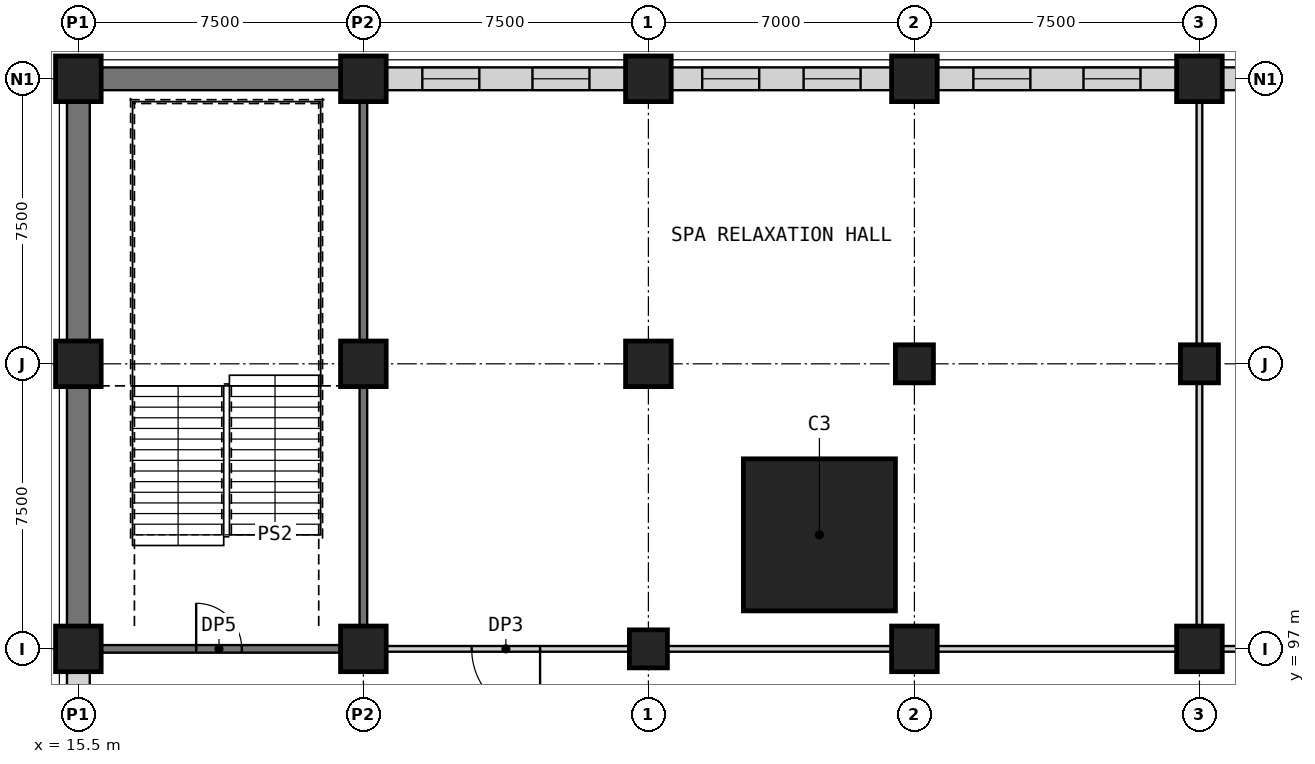
"""IFC4 building model, lengths in metres.
Left out: names, types, materials, properties, quantities, classifications, styles, units other than length and angle.
Written with IfcOpenShell. Run it as: python <this file> out.ifc"""

import sys

from ifc_helpers import new_model, si_unit, direction, frame, frame_2d, origin, origin_2d, place, context, subcontext, project, spatial, rectangle, extrude, element, fill, save


model = new_model("IFC4")
c1 = context("Model", 3, precision=1e-05, world=origin(), true_north=direction((0.0, 1.0)))
c2 = subcontext(c1, "Body", "Model", "MODEL_VIEW")
j1 = project(units=[si_unit("LENGTHUNIT", "METRE"), si_unit("PLANEANGLEUNIT", "RADIAN")], contexts=[c1])
p1 = place(None, origin())
s1 = spatial("IfcSite", under=j1, at=p1, CompositionType="ELEMENT")
p2 = place(p1, origin())
s2 = spatial("IfcBuilding", under=s1, at=p2, CompositionType="ELEMENT")
p3 = place(p2, frame((0.0, 0.0, 29.0)))
s3 = spatial("IfcBuildingStorey", under=s2, at=p3, CompositionType="ELEMENT", Elevation=29.0)
p4 = place(p3, frame((30.5, 97.0, 0.0), z_axis=(0.0, 0.0, 1.0), x_axis=(1.0, 0.0, 0.0)))
e1 = element("IfcColumn", 1, at=p4, inside=s3, PredefinedType="COLUMN", context=c2, shape_type="SweptSolid", body=[
    extrude(rectangle(XDim=1.0, YDim=1.0, at=origin_2d()), origin(), (0.0, 0.0, 1.0), 5.0),
])
p5 = place(p3, frame((37.5, 97.0, 0.0), z_axis=(0.0, 0.0, 1.0), x_axis=(1.0, 0.0, 0.0)))
e2 = element("IfcColumn", 2, at=p5, inside=s3, PredefinedType="COLUMN", context=c2, shape_type="SweptSolid", body=[
    extrude(rectangle(XDim=1.2, YDim=1.2, at=origin_2d()), origin(), (0.0, 0.0, 1.0), 5.0),
])
p6 = place(p3, frame((37.5, 104.5, 0.0), z_axis=(0.0, 0.0, 1.0), x_axis=(1.0, 0.0, 0.0)))
e3 = element("IfcColumn", 3, at=p6, inside=s3, PredefinedType="COLUMN", context=c2, shape_type="SweptSolid", body=[
    extrude(rectangle(XDim=1.0, YDim=1.0, at=origin_2d()), origin(), (0.0, 0.0, 1.0), 5.0),
])
p7 = place(p3, frame((45.0, 97.0, 0.0), z_axis=(0.0, 0.0, 1.0), x_axis=(1.0, 0.0, 0.0)))
e4 = element("IfcColumn", 4, at=p7, inside=s3, PredefinedType="COLUMN", context=c2, shape_type="SweptSolid", body=[
    extrude(rectangle(XDim=1.2, YDim=1.2, at=origin_2d()), origin(), (0.0, 0.0, 1.0), 5.0),
])
p8 = place(p3, frame((45.0, 104.5, 0.0), z_axis=(0.0, 0.0, 1.0), x_axis=(1.0, 0.0, 0.0)))
e5 = element("IfcColumn", 5, at=p8, inside=s3, PredefinedType="COLUMN", context=c2, shape_type="SweptSolid", body=[
    extrude(rectangle(XDim=1.0, YDim=1.0, at=origin_2d()), origin(), (0.0, 0.0, 1.0), 5.0),
])
p9 = place(p3, frame((35.0, 100.0, 0.0), z_axis=(0.0, 0.0, 1.0), x_axis=(1.0, 0.0, 0.0)))
e6 = element("IfcColumn", 6, at=p9, inside=s3, PredefinedType="COLUMN", context=c2, shape_type="SweptSolid", body=[
    extrude(rectangle(XDim=4.0, YDim=4.0, at=origin_2d()), origin(), (0.0, 0.0, 1.0), 5.0),
])
for number, where, z_axis, x_axis in (
    (7, (15.5, 97.0, 0.0), (0.0, 0.0, 1.0), (1.0, 0.0, 0.0)),
    (8, (15.5, 104.5, 0.0), (0.0, 0.0, 1.0), (1.0, 0.0, 0.0)),
    (9, (15.5, 112.0, 0.0), (0.0, 0.0, 1.0), (1.0, 0.0, 0.0)),
    (10, (23.0, 97.0, 0.0), (0.0, 0.0, 1.0), (1.0, 0.0, 0.0)),
    (11, (23.0, 104.5, 0.0), (0.0, 0.0, 1.0), (1.0, 0.0, 0.0)),
    (12, (23.0, 112.0, 0.0), (0.0, 0.0, 1.0), (1.0, 0.0, 0.0)),
    (13, (30.5, 104.5, 0.0), (0.0, 0.0, 1.0), (1.0, 0.0, 0.0)),
    (14, (30.5, 112.0, 0.0), (0.0, 0.0, 1.0), (1.0, 0.0, 0.0)),
    (15, (37.5, 112.0, 0.0), (0.0, 0.0, 1.0), (1.0, 0.0, 0.0)),
    (16, (45.0, 112.0, 0.0), (0.0, 0.0, 1.0), (1.0, 0.0, 0.0)),
):
    element("IfcColumn", number, at=place(p3, frame(where, z_axis=z_axis, x_axis=x_axis)), inside=s3, PredefinedType="COLUMN", context=c2, shape_type="SweptSolid", body=[
        extrude(rectangle(XDim=1.2, YDim=1.2, at=origin_2d()), origin(), (0.0, 0.0, 1.0), 5.0),
    ])
p10 = place(p3, frame((16.1, 97.0, 0.0), z_axis=(0.0, 0.0, 1.0), x_axis=(1.0, 0.0, 0.0)))
e17 = element("IfcWall", 17, at=p10, inside=s3, PredefinedType="SHEAR", context=c2, shape_type="SweptSolid", body=[
    extrude(rectangle(XDim=6.3, YDim=0.2, at=frame_2d((3.15, 0.0))), origin(), (0.0, 0.0, 1.0), 4.7),
])
p11 = place(p10, frame((2.5, 0.0, 0.0)))
e18 = element("IfcOpeningElement", 18, at=p11, cuts=e17, PredefinedType="OPENING", context=c2, shape_type="SweptSolid", body=[
    extrude(rectangle(XDim=1.2, YDim=2.1, at=frame_2d((0.6, 1.05))), frame((0.0, 0.11, 0.0), z_axis=(0.0, -1.0, 0.0), x_axis=(1.0, 0.0, 0.0)), (0.0, 0.0, 1.0), 0.22),
])
p12 = place(p3, frame((30.0, 97.0, 0.0), z_axis=(0.0, 0.0, 1.0), x_axis=(-1.0, 0.0, 0.0)))
e19 = element("IfcWall", 19, at=p12, inside=s3, PredefinedType="PARTITIONING", context=c2, shape_type="SweptSolid", body=[
    extrude(rectangle(XDim=6.4, YDim=0.15, at=frame_2d((3.2, 0.0))), origin(), (0.0, 0.0, 1.0), 4.7),
])
p13 = place(p12, frame((2.35, 0.0, 0.0)))
e20 = element("IfcOpeningElement", 20, at=p13, cuts=e19, PredefinedType="OPENING", context=c2, shape_type="SweptSolid", body=[
    extrude(rectangle(XDim=1.8, YDim=2.4, at=frame_2d((0.9, 1.2))), frame((0.0, 0.085, 0.0), z_axis=(0.0, -1.0, 0.0), x_axis=(1.0, 0.0, 0.0)), (0.0, 0.0, 1.0), 0.17),
])
p14 = place(p3, frame((31.0, 97.0, 0.0), z_axis=(0.0, 0.0, 1.0), x_axis=(1.0, 0.0, 0.0)))
e21 = element("IfcWall", 21, at=p14, inside=s3, PredefinedType="PARTITIONING", context=c2, shape_type="SweptSolid", body=[
    extrude(rectangle(XDim=5.9, YDim=0.15, at=frame_2d((2.95, 0.0))), origin(), (0.0, 0.0, 1.0), 4.7),
])
p15 = place(p3, frame((38.1, 97.0, 0.0), z_axis=(0.0, 0.0, 1.0), x_axis=(1.0, 0.0, 0.0)))
e22 = element("IfcWall", 22, at=p15, inside=s3, PredefinedType="PARTITIONING", context=c2, shape_type="SweptSolid", body=[
    extrude(rectangle(XDim=6.3, YDim=0.15, at=frame_2d((3.15, 0.0))), origin(), (0.0, 0.0, 1.0), 4.7),
])
p16 = place(p3, frame((51.9, 97.0, 0.0), z_axis=(0.0, 0.0, 1.0), x_axis=(-1.0, 0.0, 0.0)))
e23 = element("IfcWall", 23, at=p16, inside=s3, PredefinedType="PARTITIONING", context=c2, shape_type="SweptSolid", body=[
    extrude(rectangle(XDim=6.3, YDim=0.15, at=frame_2d((3.15, 0.0))), origin(), (0.0, 0.0, 1.0), 4.7),
])
p17 = place(p16, frame((2.25, 0.0, 0.0)))
e24 = element("IfcOpeningElement", 24, at=p17, cuts=e23, PredefinedType="OPENING", context=c2, shape_type="SweptSolid", body=[
    extrude(rectangle(XDim=1.8, YDim=2.4, at=frame_2d((0.9, 1.2))), frame((0.0, 0.085, 0.0), z_axis=(0.0, -1.0, 0.0), x_axis=(1.0, 0.0, 0.0)), (0.0, 0.0, 1.0), 0.17),
])
p18 = place(p3, frame((16.1, 112.0, 0.0), z_axis=(0.0, 0.0, 1.0), x_axis=(1.0, 0.0, 0.0)))
e25 = element("IfcWall", 25, at=p18, inside=s3, PredefinedType="PARTITIONING", context=c2, shape_type="SweptSolid", body=[
    extrude(rectangle(XDim=6.3, YDim=0.6, at=frame_2d((3.15, 0.0))), origin(), (0.0, 0.0, 1.0), 4.7),
])
p19 = place(p3, frame((23.6, 112.0, 0.0), z_axis=(0.0, 0.0, 1.0), x_axis=(1.0, 0.0, 0.0)))
e26 = element("IfcWall", 26, at=p19, inside=s3, PredefinedType="PARTITIONING", context=c2, shape_type="SweptSolid", body=[
    extrude(rectangle(XDim=6.3, YDim=0.6, at=frame_2d((3.15, 0.0))), origin(), (0.0, 0.0, 1.0), 4.7),
])
p20 = place(p19, frame((0.951, 0.0, 0.9)))
e27 = element("IfcOpeningElement", 27, at=p20, cuts=e26, PredefinedType="OPENING", context=c2, shape_type="SweptSolid", body=[
    extrude(rectangle(XDim=1.5, YDim=2.8, at=frame_2d((0.75, 1.4))), frame((0.0, 0.31, 0.0), z_axis=(0.0, -1.0, 0.0), x_axis=(1.0, 0.0, 0.0)), (0.0, 0.0, 1.0), 0.62),
])
p21 = place(p19, frame((3.849, 0.0, 0.9)))
e28 = element("IfcOpeningElement", 28, at=p21, cuts=e26, PredefinedType="OPENING", context=c2, shape_type="SweptSolid", body=[
    extrude(rectangle(XDim=1.5, YDim=2.8, at=frame_2d((0.75, 1.4))), frame((0.0, 0.31, 0.0), z_axis=(0.0, -1.0, 0.0), x_axis=(1.0, 0.0, 0.0)), (0.0, 0.0, 1.0), 0.62),
])
p22 = place(p3, frame((31.1, 112.0, 0.0), z_axis=(0.0, 0.0, 1.0), x_axis=(1.0, 0.0, 0.0)))
e29 = element("IfcWall", 29, at=p22, inside=s3, PredefinedType="PARTITIONING", context=c2, shape_type="SweptSolid", body=[
    extrude(rectangle(XDim=5.8, YDim=0.6, at=frame_2d((2.9, 0.0))), origin(), (0.0, 0.0, 1.0), 4.7),
])
p23 = place(p22, frame((0.816, 0.0, 0.9)))
e30 = element("IfcOpeningElement", 30, at=p23, cuts=e29, PredefinedType="OPENING", context=c2, shape_type="SweptSolid", body=[
    extrude(rectangle(XDim=1.5, YDim=2.8, at=frame_2d((0.75, 1.4))), frame((0.0, 0.31, 0.0), z_axis=(0.0, -1.0, 0.0), x_axis=(1.0, 0.0, 0.0)), (0.0, 0.0, 1.0), 0.62),
])
p24 = place(p22, frame((3.484, 0.0, 0.9)))
e31 = element("IfcOpeningElement", 31, at=p24, cuts=e29, PredefinedType="OPENING", context=c2, shape_type="SweptSolid", body=[
    extrude(rectangle(XDim=1.5, YDim=2.8, at=frame_2d((0.75, 1.4))), frame((0.0, 0.31, 0.0), z_axis=(0.0, -1.0, 0.0), x_axis=(1.0, 0.0, 0.0)), (0.0, 0.0, 1.0), 0.62),
])
p25 = place(p3, frame((38.1, 112.0, 0.0), z_axis=(0.0, 0.0, 1.0), x_axis=(1.0, 0.0, 0.0)))
e32 = element("IfcWall", 32, at=p25, inside=s3, PredefinedType="PARTITIONING", context=c2, shape_type="SweptSolid", body=[
    extrude(rectangle(XDim=6.3, YDim=0.6, at=frame_2d((3.15, 0.0))), origin(), (0.0, 0.0, 1.0), 4.7),
])
p26 = place(p25, frame((0.951, 0.0, 0.9)))
e33 = element("IfcOpeningElement", 33, at=p26, cuts=e32, PredefinedType="OPENING", context=c2, shape_type="SweptSolid", body=[
    extrude(rectangle(XDim=1.5, YDim=2.8, at=frame_2d((0.75, 1.4))), frame((0.0, 0.31, 0.0), z_axis=(0.0, -1.0, 0.0), x_axis=(1.0, 0.0, 0.0)), (0.0, 0.0, 1.0), 0.62),
])
p27 = place(p25, frame((3.849, 0.0, 0.9)))
e34 = element("IfcOpeningElement", 34, at=p27, cuts=e32, PredefinedType="OPENING", context=c2, shape_type="SweptSolid", body=[
    extrude(rectangle(XDim=1.5, YDim=2.8, at=frame_2d((0.75, 1.4))), frame((0.0, 0.31, 0.0), z_axis=(0.0, -1.0, 0.0), x_axis=(1.0, 0.0, 0.0)), (0.0, 0.0, 1.0), 0.62),
])
p28 = place(p3, frame((45.6, 112.0, 0.0), z_axis=(0.0, 0.0, 1.0), x_axis=(1.0, 0.0, 0.0)))
e35 = element("IfcWall", 35, at=p28, inside=s3, PredefinedType="PARTITIONING", context=c2, shape_type="SweptSolid", body=[
    extrude(rectangle(XDim=6.3, YDim=0.6, at=frame_2d((3.15, 0.0))), origin(), (0.0, 0.0, 1.0), 4.7),
])
p29 = place(p28, frame((0.951, 0.0, 0.9)))
e36 = element("IfcOpeningElement", 36, at=p29, cuts=e35, PredefinedType="OPENING", context=c2, shape_type="SweptSolid", body=[
    extrude(rectangle(XDim=1.5, YDim=2.8, at=frame_2d((0.75, 1.4))), frame((0.0, 0.31, 0.0), z_axis=(0.0, -1.0, 0.0), x_axis=(1.0, 0.0, 0.0)), (0.0, 0.0, 1.0), 0.62),
])
p30 = place(p28, frame((3.849, 0.0, 0.9)))
e37 = element("IfcOpeningElement", 37, at=p30, cuts=e35, PredefinedType="OPENING", context=c2, shape_type="SweptSolid", body=[
    extrude(rectangle(XDim=1.5, YDim=2.8, at=frame_2d((0.75, 1.4))), frame((0.0, 0.31, 0.0), z_axis=(0.0, -1.0, 0.0), x_axis=(1.0, 0.0, 0.0)), (0.0, 0.0, 1.0), 0.62),
])
p31 = place(p3, frame((15.5, 90.6, 0.0), z_axis=(0.0, 0.0, 1.0), x_axis=(0.0, 1.0, 0.0)))
e38 = element("IfcWall", 38, at=p31, inside=s3, PredefinedType="PARTITIONING", context=c2, shape_type="SweptSolid", body=[
    extrude(rectangle(XDim=5.8, YDim=0.6, at=frame_2d((2.9, 0.0))), origin(), (0.0, 0.0, 1.0), 4.7),
])
p32 = place(p31, frame((0.816, 0.0, 0.9)))
e39 = element("IfcOpeningElement", 39, at=p32, cuts=e38, PredefinedType="OPENING", context=c2, shape_type="SweptSolid", body=[
    extrude(rectangle(XDim=1.5, YDim=2.8, at=frame_2d((0.75, 1.4))), frame((0.0, 0.31, 0.0), z_axis=(0.0, -1.0, 0.0), x_axis=(1.0, 0.0, 0.0)), (0.0, 0.0, 1.0), 0.62),
])
p33 = place(p31, frame((3.484, 0.0, 0.9)))
e40 = element("IfcOpeningElement", 40, at=p33, cuts=e38, PredefinedType="OPENING", context=c2, shape_type="SweptSolid", body=[
    extrude(rectangle(XDim=1.5, YDim=2.8, at=frame_2d((0.75, 1.4))), frame((0.0, 0.31, 0.0), z_axis=(0.0, -1.0, 0.0), x_axis=(1.0, 0.0, 0.0)), (0.0, 0.0, 1.0), 0.62),
])
for number, where, z_axis, x_axis in (
    (41, (15.5, 97.6, 0.0), (0.0, 0.0, 1.0), (0.0, 1.0, 0.0)),
    (42, (15.5, 105.1, 0.0), (0.0, 0.0, 1.0), (0.0, 1.0, 0.0)),
):
    element("IfcWall", number, at=place(p3, frame(where, z_axis=z_axis, x_axis=x_axis)), inside=s3, PredefinedType="PARTITIONING", context=c2, shape_type="SweptSolid", body=[
        extrude(rectangle(XDim=6.3, YDim=0.6, at=frame_2d((3.15, 0.0))), origin(), (0.0, 0.0, 1.0), 4.7),
    ])
for number, where, z_axis, x_axis in (
    (43, (23.0, 97.6, 0.0), (0.0, 0.0, 1.0), (0.0, 1.0, 0.0)),
    (44, (23.0, 105.1, 0.0), (0.0, 0.0, 1.0), (0.0, 1.0, 0.0)),
):
    element("IfcWall", number, at=place(p3, frame(where, z_axis=z_axis, x_axis=x_axis)), inside=s3, PredefinedType="SHEAR", context=c2, shape_type="SweptSolid", body=[
        extrude(rectangle(XDim=6.3, YDim=0.2, at=frame_2d((3.15, 0.0))), origin(), (0.0, 0.0, 1.0), 4.7),
    ])
for number, where, z_axis, x_axis in (
    (45, (45.0, 97.6, 0.0), (0.0, 0.0, 1.0), (0.0, 1.0, 0.0)),
    (46, (45.0, 105.0, 0.0), (0.0, 0.0, 1.0), (0.0, 1.0, 0.0)),
):
    element("IfcWall", number, at=place(p3, frame(where, z_axis=z_axis, x_axis=x_axis)), inside=s3, PredefinedType="PARTITIONING", context=c2, shape_type="SweptSolid", body=[
        extrude(rectangle(XDim=6.4, YDim=0.15, at=frame_2d((3.2, 0.0))), origin(), (0.0, 0.0, 1.0), 4.7),
    ])
p34 = place(p11, origin())
e47 = element("IfcDoor", 47, at=p34, inside=s3, OperationType="SINGLE_SWING_LEFT", PredefinedType="DOOR", context=c2, shape_type="SweptSolid", body=[
    extrude(rectangle(XDim=1.2, YDim=2.1, at=frame_2d((0.6, 1.05))), frame((0.0, 0.025, 0.0), z_axis=(0.0, -1.0, 0.0), x_axis=(1.0, 0.0, 0.0)), (0.0, 0.0, 1.0), 0.05),
])
fill(e18, e47)
p35 = place(p13, origin())
e48 = element("IfcDoor", 48, at=p35, inside=s3, OperationType="SINGLE_SWING_LEFT", PredefinedType="DOOR", context=c2, shape_type="SweptSolid", body=[
    extrude(rectangle(XDim=1.8, YDim=2.4, at=frame_2d((0.9, 1.2))), frame((0.0, 0.025, 0.0), z_axis=(0.0, -1.0, 0.0), x_axis=(1.0, 0.0, 0.0)), (0.0, 0.0, 1.0), 0.05),
])
fill(e20, e48)
p36 = place(p20, origin())
e49 = element("IfcWindow", 49, at=p36, inside=s3, PartitioningType="SINGLE_PANEL", PredefinedType="WINDOW", context=c2, shape_type="SweptSolid", body=[
    extrude(rectangle(XDim=1.5, YDim=2.8, at=frame_2d((0.75, 1.4))), frame((0.0, 0.03, 0.0), z_axis=(0.0, -1.0, 0.0), x_axis=(1.0, 0.0, 0.0)), (0.0, 0.0, 1.0), 0.06),
])
fill(e27, e49)
p37 = place(p21, origin())
e50 = element("IfcWindow", 50, at=p37, inside=s3, PartitioningType="SINGLE_PANEL", PredefinedType="WINDOW", context=c2, shape_type="SweptSolid", body=[
    extrude(rectangle(XDim=1.5, YDim=2.8, at=frame_2d((0.75, 1.4))), frame((0.0, 0.03, 0.0), z_axis=(0.0, -1.0, 0.0), x_axis=(1.0, 0.0, 0.0)), (0.0, 0.0, 1.0), 0.06),
])
fill(e28, e50)
p38 = place(p23, origin())
e51 = element("IfcWindow", 51, at=p38, inside=s3, PartitioningType="SINGLE_PANEL", PredefinedType="WINDOW", context=c2, shape_type="SweptSolid", body=[
    extrude(rectangle(XDim=1.5, YDim=2.8, at=frame_2d((0.75, 1.4))), frame((0.0, 0.03, 0.0), z_axis=(0.0, -1.0, 0.0), x_axis=(1.0, 0.0, 0.0)), (0.0, 0.0, 1.0), 0.06),
])
fill(e30, e51)
p39 = place(p24, origin())
e52 = element("IfcWindow", 52, at=p39, inside=s3, PartitioningType="SINGLE_PANEL", PredefinedType="WINDOW", context=c2, shape_type="SweptSolid", body=[
    extrude(rectangle(XDim=1.5, YDim=2.8, at=frame_2d((0.75, 1.4))), frame((0.0, 0.03, 0.0), z_axis=(0.0, -1.0, 0.0), x_axis=(1.0, 0.0, 0.0)), (0.0, 0.0, 1.0), 0.06),
])
fill(e31, e52)
p40 = place(p26, origin())
e53 = element("IfcWindow", 53, at=p40, inside=s3, PartitioningType="SINGLE_PANEL", PredefinedType="WINDOW", context=c2, shape_type="SweptSolid", body=[
    extrude(rectangle(XDim=1.5, YDim=2.8, at=frame_2d((0.75, 1.4))), frame((0.0, 0.03, 0.0), z_axis=(0.0, -1.0, 0.0), x_axis=(1.0, 0.0, 0.0)), (0.0, 0.0, 1.0), 0.06),
])
fill(e33, e53)
p41 = place(p27, origin())
e54 = element("IfcWindow", 54, at=p41, inside=s3, PartitioningType="SINGLE_PANEL", PredefinedType="WINDOW", context=c2, shape_type="SweptSolid", body=[
    extrude(rectangle(XDim=1.5, YDim=2.8, at=frame_2d((0.75, 1.4))), frame((0.0, 0.03, 0.0), z_axis=(0.0, -1.0, 0.0), x_axis=(1.0, 0.0, 0.0)), (0.0, 0.0, 1.0), 0.06),
])
fill(e34, e54)
save(model, sys.argv[1])
